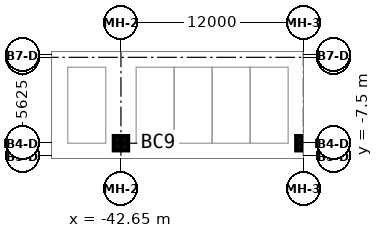
"""IFC4 building model, lengths in metres.
Left out: names, types, materials, properties, quantities, classifications, styles, units other than length and angle.
Written with IfcOpenShell. Run it as: python <this file> out.ifc"""

import sys

from ifc_helpers import new_model, si_unit, direction, frame, origin, origin_2d, place, context, subcontext, project, spatial, rectangle, extrude, source, transform, mapped, element, save


model = new_model("IFC4")
c1 = context("Model", 3, precision=1e-05, world=origin(), true_north=direction((0.0, 1.0)))
c2 = subcontext(c1, "Body", "Model", "MODEL_VIEW")
j1 = project(units=[si_unit("LENGTHUNIT", "METRE"), si_unit("PLANEANGLEUNIT", "RADIAN")], contexts=[c1])
p1 = place(None, origin())
s1 = spatial("IfcSite", under=j1, at=p1, CompositionType="ELEMENT")
p2 = place(p1, origin())
s2 = spatial("IfcBuilding", under=s1, at=p2, CompositionType="ELEMENT")
p3 = place(p2, frame((0.0, 0.0, -4.5)))
s3 = spatial("IfcBuildingStorey", under=s2, at=p3, CompositionType="ELEMENT", Elevation=-4.5)
m1 = source(origin(), c2, "Body", "SweptSolid", [
    extrude(rectangle(XDim=0.9, YDim=0.9, at=origin_2d()), origin(), (0.0, 0.0, 1.0), 4.5),
])
for number, where, z_axis, x_axis in (
    (1, (-42.65, -6.65, 0.0), (0.0, 0.0, 1.0), (1.0, 0.0, 0.0)),
    (2, (-30.65, -6.65, 0.0), (0.0, 0.0, 1.0), (1.0, 0.0, 0.0)),
):
    element("IfcColumn", number, at=place(p3, frame(where, z_axis=z_axis, x_axis=x_axis)), inside=s3, PredefinedType="COLUMN", context=c2, shape_type="MappedRepresentation", body=[
        mapped(m1, transform((0.0, 0.0, 0.0))),
    ])
save(model, sys.argv[1])
